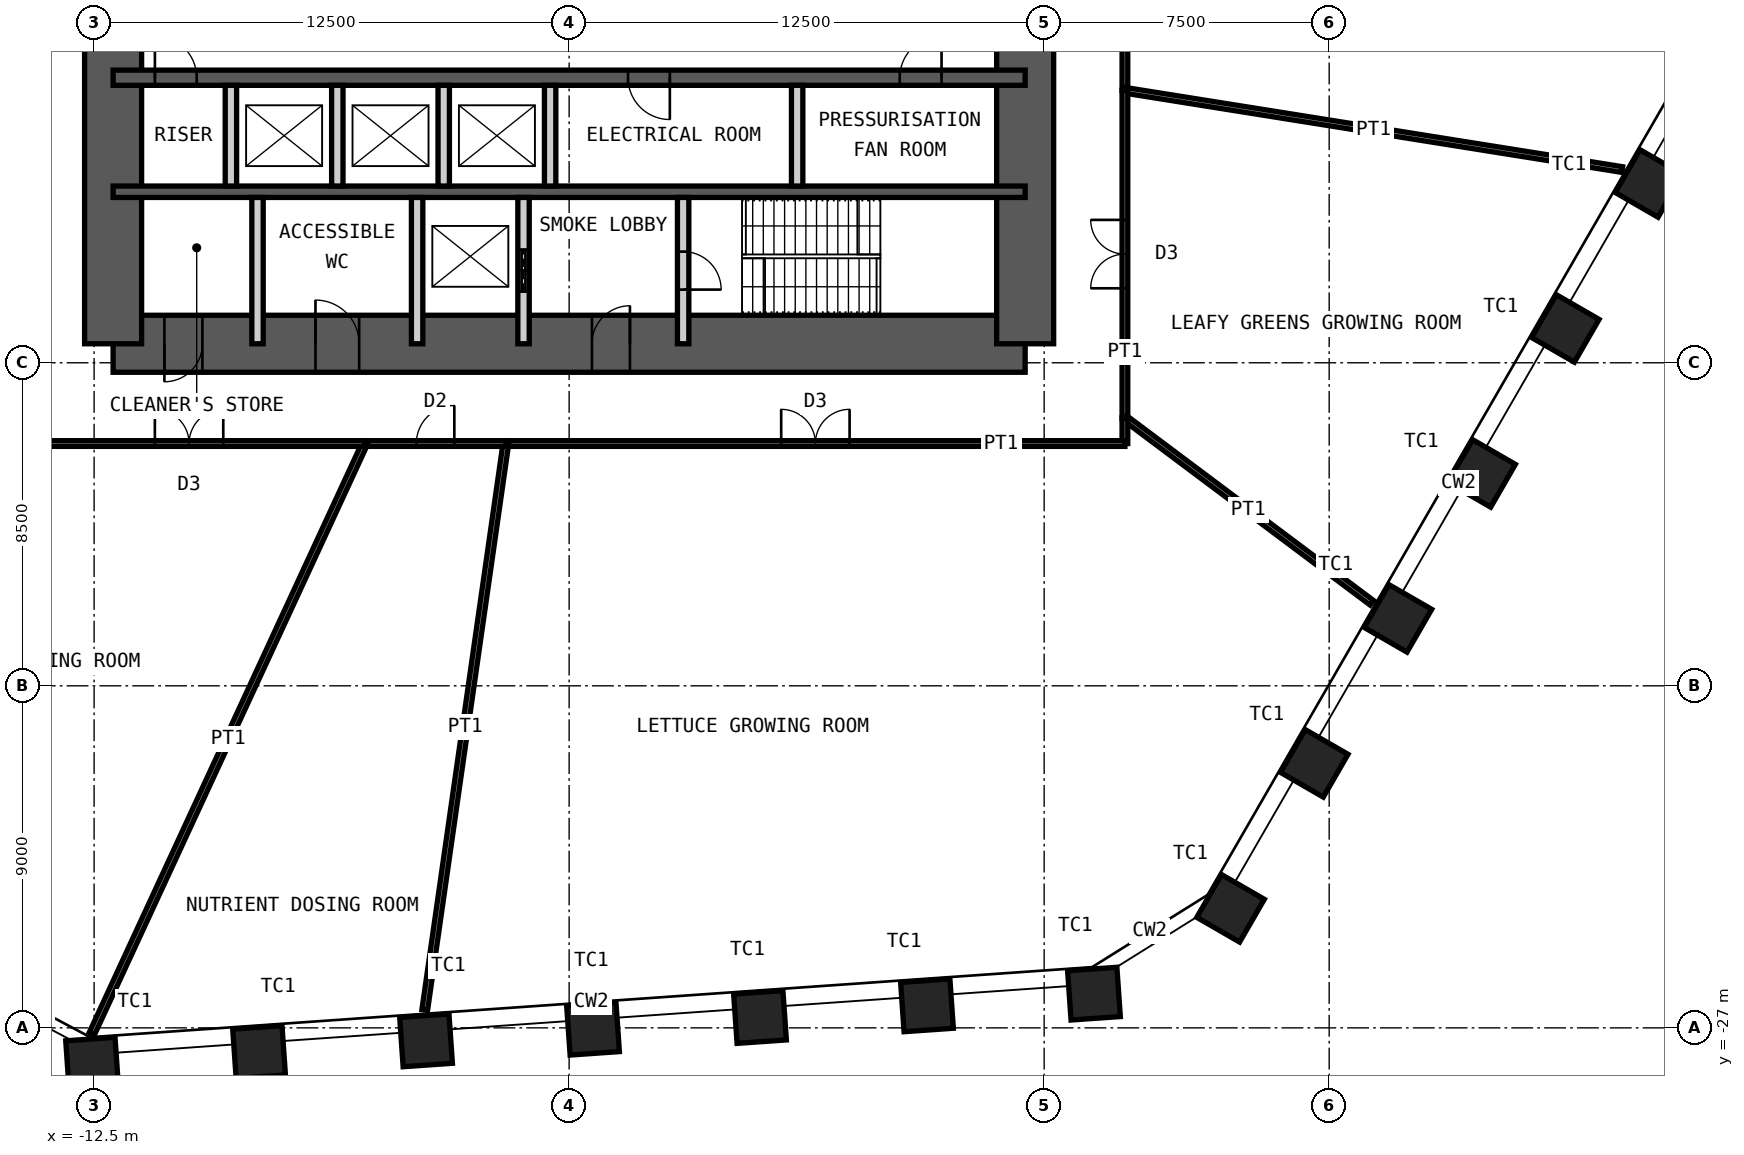
"""IFC4 building model, lengths in metres.
Left out: names, types, materials, properties, quantities, classifications, styles, units other than length and angle.
Written with IfcOpenShell. Run it as: python <this file> out.ifc"""

import sys

from ifc_helpers import new_model, si_unit, direction, frame, frame_2d, origin, origin_2d, place, context, subcontext, project, spatial, rectangle, hollow_rectangle, extrude, element, fill, save


model = new_model("IFC4")
c1 = context("Model", 3, precision=1e-05, world=origin(), true_north=direction((0.0, 1.0)))
c2 = subcontext(c1, "Body", "Model", "MODEL_VIEW")
j1 = project(units=[si_unit("LENGTHUNIT", "METRE"), si_unit("PLANEANGLEUNIT", "RADIAN")], contexts=[c1])
p1 = place(None, origin())
s1 = spatial("IfcSite", under=j1, at=p1, CompositionType="ELEMENT")
p2 = place(p1, origin())
s2 = spatial("IfcBuilding", under=s1, at=p2, CompositionType="ELEMENT")
p3 = place(p2, frame((0.0, 0.0, 37.0)))
s3 = spatial("IfcBuildingStorey", under=s2, at=p3, CompositionType="ELEMENT", Elevation=37.0)
for number, where, z_axis, x_axis in (
    (1, (28.416, -4.782, 0.0), (0.0, 0.0, 1.0), (0.5, 0.866, 0.0)),
    (2, (26.214, -8.596, 0.0), (0.0, 0.0, 1.0), (0.5, 0.866, 0.0)),
    (3, (24.011, -12.411, 0.0), (0.0, 0.0, 1.0), (0.5, 0.866, 0.0)),
    (4, (21.809, -16.225, 0.0), (0.0, 0.0, 1.0), (0.5, 0.866, 0.0)),
    (5, (19.607, -20.04, 0.0), (0.0, 0.0, 1.0), (0.5, 0.866, 0.0)),
    (6, (17.405, -23.854, 0.0), (0.0, 0.0, 1.0), (0.5, 0.866, 0.0)),
    (7, (13.811, -26.1, 0.0), (0.0, 0.0, 1.0), (0.998, 0.07, 0.0)),
    (8, (9.417, -26.407, 0.0), (0.0, 0.0, 1.0), (0.998, 0.07, 0.0)),
    (9, (5.023, -26.715, 0.0), (0.0, 0.0, 1.0), (0.998, 0.07, 0.0)),
    (10, (0.629, -27.022, 0.0), (0.0, 0.0, 1.0), (0.998, 0.07, 0.0)),
    (11, (-3.765, -27.329, 0.0), (0.0, 0.0, 1.0), (0.998, 0.07, 0.0)),
    (12, (-8.159, -27.636, 0.0), (0.0, 0.0, 1.0), (0.998, 0.07, 0.0)),
    (13, (-12.553, -27.944, 0.0), (0.0, 0.0, 1.0), (0.998, 0.07, 0.0)),
):
    element("IfcColumn", number, at=place(p3, frame(where, z_axis=z_axis, x_axis=x_axis)), inside=s3, PredefinedType="COLUMN", context=c2, shape_type="SweptSolid", body=[
        extrude(hollow_rectangle(XDim=1.3, YDim=1.3, WallThickness=0.1, at=origin_2d()), origin(), (0.0, 0.0, 1.0), 5.0),
    ])
p4 = place(p3, frame((-12.0, -9.0, 0.0), z_axis=(0.0, 0.0, 1.0), x_axis=(1.0, 0.0, 0.0)))
e14 = element("IfcWall", 14, at=p4, inside=s3, PredefinedType="SHEAR", context=c2, shape_type="SweptSolid", body=[
    extrude(rectangle(XDim=24.0, YDim=1.5, at=frame_2d((12.0, 0.0))), origin(), (0.0, 0.0, 1.0), 5.0),
])
p5 = place(p4, frame((1.35, 0.0, 0.0)))
e15 = element("IfcOpeningElement", 15, at=p5, cuts=e14, PredefinedType="OPENING", context=c2, shape_type="SweptSolid", body=[
    extrude(rectangle(XDim=1.0, YDim=2.1, at=frame_2d((0.5, 1.05))), frame((0.0, 0.76, 0.0), z_axis=(0.0, -1.0, 0.0), x_axis=(1.0, 0.0, 0.0)), (0.0, 0.0, 1.0), 1.52),
])
p6 = place(p4, frame((5.325, 0.0, 0.0)))
e16 = element("IfcOpeningElement", 16, at=p6, cuts=e14, PredefinedType="OPENING", context=c2, shape_type="SweptSolid", body=[
    extrude(rectangle(XDim=1.15, YDim=2.1, at=frame_2d((0.575, 1.05))), frame((0.0, 0.76, 0.0), z_axis=(0.0, -1.0, 0.0), x_axis=(1.0, 0.0, 0.0)), (0.0, 0.0, 1.0), 1.52),
])
p7 = place(p4, frame((12.6, 0.0, 0.0)))
e17 = element("IfcOpeningElement", 17, at=p7, cuts=e14, PredefinedType="OPENING", context=c2, shape_type="SweptSolid", body=[
    extrude(rectangle(XDim=1.0, YDim=2.1, at=frame_2d((0.5, 1.05))), frame((0.0, 0.76, 0.0), z_axis=(0.0, -1.0, 0.0), x_axis=(1.0, 0.0, 0.0)), (0.0, 0.0, 1.0), 1.52),
])
p8 = place(p3, frame((12.0, -9.0, 0.0), z_axis=(0.0, 0.0, 1.0), x_axis=(0.0, 1.0, 0.0)))
e18 = element("IfcWall", 18, at=p8, inside=s3, PredefinedType="SHEAR", context=c2, shape_type="SweptSolid", body=[
    extrude(rectangle(XDim=18.0, YDim=1.5, at=frame_2d((9.0, 0.0))), origin(), (0.0, 0.0, 1.0), 5.0),
])
p9 = place(p8, frame((8.1, 0.0, 0.0)))
e19 = element("IfcOpeningElement", 19, at=p9, cuts=e18, PredefinedType="OPENING", context=c2, shape_type="SweptSolid", body=[
    extrude(rectangle(XDim=1.8, YDim=2.1, at=frame_2d((0.9, 1.05))), frame((0.0, 0.76, 0.0), z_axis=(0.0, -1.0, 0.0), x_axis=(1.0, 0.0, 0.0)), (0.0, 0.0, 1.0), 1.52),
])
p10 = place(p3, frame((-12.0, -9.0, 0.0), z_axis=(0.0, 0.0, 1.0), x_axis=(0.0, 1.0, 0.0)))
e20 = element("IfcWall", 20, at=p10, inside=s3, PredefinedType="SHEAR", context=c2, shape_type="SweptSolid", body=[
    extrude(rectangle(XDim=18.0, YDim=1.5, at=frame_2d((9.0, 0.0))), origin(), (0.0, 0.0, 1.0), 5.0),
])
p11 = place(p10, frame((8.1, 0.0, 0.0)))
e21 = element("IfcOpeningElement", 21, at=p11, cuts=e20, PredefinedType="OPENING", context=c2, shape_type="SweptSolid", body=[
    extrude(rectangle(XDim=1.8, YDim=2.1, at=frame_2d((0.9, 1.05))), frame((0.0, 0.76, 0.0), z_axis=(0.0, -1.0, 0.0), x_axis=(1.0, 0.0, 0.0)), (0.0, 0.0, 1.0), 1.52),
])
p12 = place(p3, frame((-12.0, -2.0, 0.0), z_axis=(0.0, 0.0, 1.0), x_axis=(1.0, 0.0, 0.0)))
e22 = element("IfcWall", 22, at=p12, inside=s3, PredefinedType="SHEAR", context=c2, shape_type="SweptSolid", body=[
    extrude(rectangle(XDim=24.0, YDim=0.4, at=frame_2d((12.0, 0.0))), origin(), (0.0, 0.0, 1.0), 5.0),
])
p13 = place(p12, frame((1.1, 0.0, 0.0)))
e23 = element("IfcOpeningElement", 23, at=p13, cuts=e22, PredefinedType="OPENING", context=c2, shape_type="SweptSolid", body=[
    extrude(rectangle(XDim=1.1, YDim=2.1, at=frame_2d((0.55, 1.05))), frame((0.0, 0.21, 0.0), z_axis=(0.0, -1.0, 0.0), x_axis=(1.0, 0.0, 0.0)), (0.0, 0.0, 1.0), 0.42),
])
p14 = place(p12, frame((13.55, 0.0, 0.0)))
e24 = element("IfcOpeningElement", 24, at=p14, cuts=e22, PredefinedType="OPENING", context=c2, shape_type="SweptSolid", body=[
    extrude(rectangle(XDim=1.1, YDim=2.1, at=frame_2d((0.55, 1.05))), frame((0.0, 0.21, 0.0), z_axis=(0.0, -1.0, 0.0), x_axis=(1.0, 0.0, 0.0)), (0.0, 0.0, 1.0), 0.42),
])
p15 = place(p12, frame((20.7, 0.0, 0.0)))
e25 = element("IfcOpeningElement", 25, at=p15, cuts=e22, PredefinedType="OPENING", context=c2, shape_type="SweptSolid", body=[
    extrude(rectangle(XDim=1.1, YDim=2.1, at=frame_2d((0.55, 1.05))), frame((0.0, 0.21, 0.0), z_axis=(0.0, -1.0, 0.0), x_axis=(1.0, 0.0, 0.0)), (0.0, 0.0, 1.0), 0.42),
])
p16 = place(p3, frame((-12.0, -5.0, 0.0), z_axis=(0.0, 0.0, 1.0), x_axis=(1.0, 0.0, 0.0)))
e26 = element("IfcWall", 26, at=p16, inside=s3, PredefinedType="SHEAR", context=c2, shape_type="SweptSolid", body=[
    extrude(rectangle(XDim=24.0, YDim=0.3, at=frame_2d((12.0, 0.0))), origin(), (0.0, 0.0, 1.0), 5.0),
])
for number, where, z_axis, x_axis in (
    (27, (-8.9, -4.85, 0.0), (0.0, 0.0, 1.0), (0.0, 1.0, 0.0)),
    (28, (-6.1, -4.85, 0.0), (0.0, 0.0, 1.0), (0.0, 1.0, 0.0)),
    (29, (-3.3, -4.85, 0.0), (0.0, 0.0, 1.0), (0.0, 1.0, 0.0)),
    (30, (-0.5, -4.85, 0.0), (0.0, 0.0, 1.0), (0.0, 1.0, 0.0)),
    (31, (6.0, -4.85, 0.0), (0.0, 0.0, 1.0), (0.0, 1.0, 0.0)),
):
    element("IfcWall", number, at=place(p3, frame(where, z_axis=z_axis, x_axis=x_axis)), inside=s3, PredefinedType="PARTITIONING", context=c2, shape_type="SweptSolid", body=[
        extrude(rectangle(XDim=2.65, YDim=0.3, at=frame_2d((1.325, 0.0))), origin(), (0.0, 0.0, 1.0), 4.78),
    ])
for number, where, z_axis, x_axis in (
    (32, (-8.2, -9.0, 0.0), (0.0, 0.0, 1.0), (0.0, 1.0, 0.0)),
    (33, (-4.0, -9.0, 0.0), (0.0, 0.0, 1.0), (0.0, 1.0, 0.0)),
):
    element("IfcWall", number, at=place(p3, frame(where, z_axis=z_axis, x_axis=x_axis)), inside=s3, PredefinedType="PARTITIONING", context=c2, shape_type="SweptSolid", body=[
        extrude(rectangle(XDim=3.85, YDim=0.3, at=frame_2d((1.925, 0.0))), origin(), (0.0, 0.0, 1.0), 4.78),
    ])
p17 = place(p3, frame((-1.2, -9.0, 0.0), z_axis=(0.0, 0.0, 1.0), x_axis=(0.0, 1.0, 0.0)))
e34 = element("IfcWall", 34, at=p17, inside=s3, PredefinedType="PARTITIONING", context=c2, shape_type="SweptSolid", body=[
    extrude(rectangle(XDim=3.85, YDim=0.3, at=frame_2d((1.925, 0.0))), origin(), (0.0, 0.0, 1.0), 4.78),
])
p18 = place(p17, frame((1.375, 0.0, 0.0)))
e35 = element("IfcOpeningElement", 35, at=p18, cuts=e34, PredefinedType="OPENING", context=c2, shape_type="SweptSolid", body=[
    extrude(rectangle(XDim=1.1, YDim=2.4, at=frame_2d((0.55, 1.2))), frame((0.0, 0.16, 0.0), z_axis=(0.0, -1.0, 0.0), x_axis=(1.0, 0.0, 0.0)), (0.0, 0.0, 1.0), 0.32),
])
p19 = place(p3, frame((3.0, -9.0, 0.0), z_axis=(0.0, 0.0, 1.0), x_axis=(0.0, 1.0, 0.0)))
e36 = element("IfcWall", 36, at=p19, inside=s3, PredefinedType="PARTITIONING", context=c2, shape_type="SweptSolid", body=[
    extrude(rectangle(XDim=3.85, YDim=0.3, at=frame_2d((1.925, 0.0))), origin(), (0.0, 0.0, 1.0), 4.78),
])
p20 = place(p19, frame((1.425, 0.0, 0.0)))
e37 = element("IfcOpeningElement", 37, at=p20, cuts=e36, PredefinedType="OPENING", context=c2, shape_type="SweptSolid", body=[
    extrude(rectangle(XDim=1.0, YDim=2.1, at=frame_2d((0.5, 1.05))), frame((0.0, 0.16, 0.0), z_axis=(0.0, -1.0, 0.0), x_axis=(1.0, 0.0, 0.0)), (0.0, 0.0, 1.0), 0.32),
])
p21 = place(p3, frame((14.625, 5.864, 0.0), z_axis=(0.0, 0.0, 1.0), x_axis=(0.0, -1.0, 0.0)))
e38 = element("IfcWall", 38, at=p21, inside=s3, PredefinedType="PARTITIONING", context=c2, shape_type="SweptSolid", body=[
    extrude(rectangle(XDim=8.195, YDim=0.15, at=frame_2d((4.097, 0.0))), origin(), (0.0, 0.0, 1.0), 4.8),
])
p22 = place(p21, frame((3.198, 0.0, 0.0)))
e39 = element("IfcOpeningElement", 39, at=p22, cuts=e38, PredefinedType="OPENING", context=c2, shape_type="SweptSolid", body=[
    extrude(rectangle(XDim=1.8, YDim=2.4, at=frame_2d((0.9, 1.2))), frame((0.0, 0.085, 0.0), z_axis=(0.0, -1.0, 0.0), x_axis=(1.0, 0.0, 0.0)), (0.0, 0.0, 1.0), 0.17),
])
p23 = place(p3, frame((27.711, -4.416, 0.0), z_axis=(0.0, 0.0, 1.0), x_axis=(-0.987538625309, 0.15737682016, 0.0)))
e40 = element("IfcWall", 40, at=p23, inside=s3, PredefinedType="PARTITIONING", context=c2, shape_type="SweptSolid", body=[
    extrude(rectangle(XDim=13.251, YDim=0.15, at=frame_2d((6.625, 0.0))), origin(), (0.0, 0.0, 1.0), 3.7),
])
p24 = place(p3, frame((14.625, -2.331, 0.0), z_axis=(0.0, 0.0, 1.0), x_axis=(0.0, -1.0, 0.0)))
e41 = element("IfcWall", 41, at=p24, inside=s3, PredefinedType="PARTITIONING", context=c2, shape_type="SweptSolid", body=[
    extrude(rectangle(XDim=8.62, YDim=0.15, at=frame_2d((4.31, 0.0))), origin(), (0.0, 0.0, 1.0), 4.8),
])
p25 = place(p24, frame((3.41, 0.0, 0.0)))
e42 = element("IfcOpeningElement", 42, at=p25, cuts=e41, PredefinedType="OPENING", context=c2, shape_type="SweptSolid", body=[
    extrude(rectangle(XDim=1.8, YDim=2.4, at=frame_2d((0.9, 1.2))), frame((0.0, 0.085, 0.0), z_axis=(0.0, -1.0, 0.0), x_axis=(1.0, 0.0, 0.0)), (0.0, 0.0, 1.0), 0.17),
])
p26 = place(p3, frame((21.123, -15.815, 0.0), z_axis=(0.0, 0.0, 1.0), x_axis=(-0.800490565123, 0.599345355492, 0.0)))
e43 = element("IfcWall", 43, at=p26, inside=s3, PredefinedType="PARTITIONING", context=c2, shape_type="SweptSolid", body=[
    extrude(rectangle(XDim=8.118, YDim=0.15, at=frame_2d((4.059, 0.0))), origin(), (0.0, 0.0, 1.0), 3.7),
])
p27 = place(p3, frame((14.625, -10.95, 0.0), z_axis=(0.0, 0.0, 1.0), x_axis=(0.0, -1.0, 0.0)))
e44 = element("IfcWall", 44, at=p27, inside=s3, PredefinedType="PARTITIONING", context=c2, shape_type="SweptSolid", body=[
    extrude(rectangle(XDim=0.675, YDim=0.15, at=frame_2d((0.337, 0.0))), origin(), (0.0, 0.0, 1.0), 4.8),
])
p28 = place(p3, frame((14.625, -11.625, 0.0), z_axis=(0.0, 0.0, 1.0), x_axis=(-1.0, 0.0, 0.0)))
e45 = element("IfcWall", 45, at=p28, inside=s3, PredefinedType="PARTITIONING", context=c2, shape_type="SweptSolid", body=[
    extrude(rectangle(XDim=16.29, YDim=0.15, at=frame_2d((8.145, 0.0))), origin(), (0.0, 0.0, 1.0), 4.8),
])
p29 = place(p28, frame((7.245, 0.0, 0.0)))
e46 = element("IfcOpeningElement", 46, at=p29, cuts=e45, PredefinedType="OPENING", context=c2, shape_type="SweptSolid", body=[
    extrude(rectangle(XDim=1.8, YDim=2.4, at=frame_2d((0.9, 1.2))), frame((0.0, 0.085, 0.0), z_axis=(0.0, -1.0, 0.0), x_axis=(1.0, 0.0, 0.0)), (0.0, 0.0, 1.0), 0.17),
])
p30 = place(p3, frame((-3.8, -26.532, 0.0), z_axis=(0.0, 0.0, 1.0), x_axis=(0.14177542097, 0.989898848372, 0.0)))
e47 = element("IfcWall", 47, at=p30, inside=s3, PredefinedType="PARTITIONING", context=c2, shape_type="SweptSolid", body=[
    extrude(rectangle(XDim=15.059, YDim=0.15, at=frame_2d((7.53, 0.0))), origin(), (0.0, 0.0, 1.0), 3.7),
])
p31 = place(p3, frame((-1.665, -11.625, 0.0), z_axis=(0.0, 0.0, 1.0), x_axis=(-1.0, 0.0, 0.0)))
e48 = element("IfcWall", 48, at=p31, inside=s3, PredefinedType="PARTITIONING", context=c2, shape_type="SweptSolid", body=[
    extrude(rectangle(XDim=3.712, YDim=0.15, at=frame_2d((1.856, 0.0))), origin(), (0.0, 0.0, 1.0), 4.8),
])
p32 = place(p31, frame((1.356, 0.0, 0.0)))
e49 = element("IfcOpeningElement", 49, at=p32, cuts=e48, PredefinedType="OPENING", context=c2, shape_type="SweptSolid", body=[
    extrude(rectangle(XDim=1.0, YDim=2.4, at=frame_2d((0.5, 1.2))), frame((0.0, 0.085, 0.0), z_axis=(0.0, -1.0, 0.0), x_axis=(1.0, 0.0, 0.0)), (0.0, 0.0, 1.0), 0.17),
])
p33 = place(p3, frame((-12.56, -27.155, 0.0), z_axis=(0.0, 0.0, 1.0), x_axis=(0.419799104875, 0.907617051154, 0.0)))
e50 = element("IfcWall", 50, at=p33, inside=s3, PredefinedType="PARTITIONING", context=c2, shape_type="SweptSolid", body=[
    extrude(rectangle(XDim=17.11, YDim=0.15, at=frame_2d((8.555, 0.0))), origin(), (0.0, 0.0, 1.0), 3.7),
])
p34 = place(p3, frame((-5.377, -11.625, 0.0), z_axis=(0.0, 0.0, 1.0), x_axis=(-1.0, 0.0, 0.0)))
e51 = element("IfcWall", 51, at=p34, inside=s3, PredefinedType="PARTITIONING", context=c2, shape_type="SweptSolid", body=[
    extrude(rectangle(XDim=9.248, YDim=0.15, at=frame_2d((4.624, 0.0))), origin(), (0.0, 0.0, 1.0), 4.8),
])
p35 = place(p34, frame((3.724, 0.0, 0.0)))
e52 = element("IfcOpeningElement", 52, at=p35, cuts=e51, PredefinedType="OPENING", context=c2, shape_type="SweptSolid", body=[
    extrude(rectangle(XDim=1.8, YDim=2.4, at=frame_2d((0.9, 1.2))), frame((0.0, 0.085, 0.0), z_axis=(0.0, -1.0, 0.0), x_axis=(1.0, 0.0, 0.0)), (0.0, 0.0, 1.0), 0.17),
])
p36 = place(p5, origin())
e53 = element("IfcDoor", 53, at=p36, inside=s3, OperationType="SINGLE_SWING_LEFT", PredefinedType="DOOR", context=c2, shape_type="SweptSolid", body=[
    extrude(rectangle(XDim=1.0, YDim=2.1, at=frame_2d((0.5, 1.05))), frame((0.0, 0.025, 0.0), z_axis=(0.0, -1.0, 0.0), x_axis=(1.0, 0.0, 0.0)), (0.0, 0.0, 1.0), 0.05),
])
fill(e15, e53)
p37 = place(p6, origin())
e54 = element("IfcDoor", 54, at=p37, inside=s3, OperationType="SINGLE_SWING_RIGHT", PredefinedType="DOOR", context=c2, shape_type="SweptSolid", body=[
    extrude(rectangle(XDim=1.15, YDim=2.1, at=frame_2d((0.575, 1.05))), frame((0.0, 0.025, 0.0), z_axis=(0.0, -1.0, 0.0), x_axis=(1.0, 0.0, 0.0)), (0.0, 0.0, 1.0), 0.05),
])
fill(e16, e54)
p38 = place(p7, origin())
e55 = element("IfcDoor", 55, at=p38, inside=s3, OperationType="SINGLE_SWING_LEFT", PredefinedType="DOOR", context=c2, shape_type="SweptSolid", body=[
    extrude(rectangle(XDim=1.0, YDim=2.1, at=frame_2d((0.5, 1.05))), frame((0.0, 0.025, 0.0), z_axis=(0.0, -1.0, 0.0), x_axis=(1.0, 0.0, 0.0)), (0.0, 0.0, 1.0), 0.05),
])
fill(e17, e55)
p39 = place(p20, origin())
e56 = element("IfcDoor", 56, at=p39, inside=s3, OperationType="SINGLE_SWING_LEFT", PredefinedType="DOOR", context=c2, shape_type="SweptSolid", body=[
    extrude(rectangle(XDim=1.0, YDim=2.1, at=frame_2d((0.5, 1.05))), frame((0.0, 0.025, 0.0), z_axis=(0.0, -1.0, 0.0), x_axis=(1.0, 0.0, 0.0)), (0.0, 0.0, 1.0), 0.05),
])
fill(e37, e56)
p40 = place(p13, origin())
e57 = element("IfcDoor", 57, at=p40, inside=s3, OperationType="SINGLE_SWING_RIGHT", PredefinedType="DOOR", context=c2, shape_type="SweptSolid", body=[
    extrude(rectangle(XDim=1.1, YDim=2.1, at=frame_2d((0.55, 1.05))), frame((0.0, 0.025, 0.0), z_axis=(0.0, -1.0, 0.0), x_axis=(1.0, 0.0, 0.0)), (0.0, 0.0, 1.0), 0.05),
])
fill(e23, e57)
p41 = place(p14, origin())
e58 = element("IfcDoor", 58, at=p41, inside=s3, OperationType="SINGLE_SWING_RIGHT", PredefinedType="DOOR", context=c2, shape_type="SweptSolid", body=[
    extrude(rectangle(XDim=1.1, YDim=2.1, at=frame_2d((0.55, 1.05))), frame((0.0, 0.025, 0.0), z_axis=(0.0, -1.0, 0.0), x_axis=(1.0, 0.0, 0.0)), (0.0, 0.0, 1.0), 0.05),
])
fill(e24, e58)
p42 = place(p15, origin())
e59 = element("IfcDoor", 59, at=p42, inside=s3, OperationType="SINGLE_SWING_LEFT", PredefinedType="DOOR", context=c2, shape_type="SweptSolid", body=[
    extrude(rectangle(XDim=1.1, YDim=2.1, at=frame_2d((0.55, 1.05))), frame((0.0, 0.025, 0.0), z_axis=(0.0, -1.0, 0.0), x_axis=(1.0, 0.0, 0.0)), (0.0, 0.0, 1.0), 0.05),
])
fill(e25, e59)
p43 = place(p18, origin())
e60 = element("IfcDoor", 60, at=p43, inside=s3, OperationType="DOUBLE_DOOR_SLIDING", PredefinedType="DOOR", context=c2, shape_type="SweptSolid", body=[
    extrude(rectangle(XDim=1.1, YDim=2.4, at=frame_2d((0.55, 1.2))), frame((0.0, 0.025, 0.0), z_axis=(0.0, -1.0, 0.0), x_axis=(1.0, 0.0, 0.0)), (0.0, 0.0, 1.0), 0.05),
])
fill(e35, e60)
p44 = place(p25, origin())
e61 = element("IfcDoor", 61, at=p44, inside=s3, OperationType="DOUBLE_DOOR_DOUBLE_SWING", PredefinedType="DOOR", context=c2, shape_type="SweptSolid", body=[
    extrude(rectangle(XDim=1.8, YDim=2.4, at=frame_2d((0.9, 1.2))), frame((0.0, 0.025, 0.0), z_axis=(0.0, -1.0, 0.0), x_axis=(1.0, 0.0, 0.0)), (0.0, 0.0, 1.0), 0.05),
])
fill(e42, e61)
p45 = place(p29, origin())
e62 = element("IfcDoor", 62, at=p45, inside=s3, OperationType="DOUBLE_DOOR_DOUBLE_SWING", PredefinedType="DOOR", context=c2, shape_type="SweptSolid", body=[
    extrude(rectangle(XDim=1.8, YDim=2.4, at=frame_2d((0.9, 1.2))), frame((0.0, 0.025, 0.0), z_axis=(0.0, -1.0, 0.0), x_axis=(1.0, 0.0, 0.0)), (0.0, 0.0, 1.0), 0.05),
])
fill(e46, e62)
p46 = place(p32, origin())
e63 = element("IfcDoor", 63, at=p46, inside=s3, OperationType="SINGLE_SWING_LEFT", PredefinedType="DOOR", context=c2, shape_type="SweptSolid", body=[
    extrude(rectangle(XDim=1.0, YDim=2.4, at=frame_2d((0.5, 1.2))), frame((0.0, 0.025, 0.0), z_axis=(0.0, -1.0, 0.0), x_axis=(1.0, 0.0, 0.0)), (0.0, 0.0, 1.0), 0.05),
])
fill(e49, e63)
p47 = place(p35, origin())
e64 = element("IfcDoor", 64, at=p47, inside=s3, OperationType="DOUBLE_DOOR_DOUBLE_SWING", PredefinedType="DOOR", context=c2, shape_type="SweptSolid", body=[
    extrude(rectangle(XDim=1.8, YDim=2.4, at=frame_2d((0.9, 1.2))), frame((0.0, 0.025, 0.0), z_axis=(0.0, -1.0, 0.0), x_axis=(1.0, 0.0, 0.0)), (0.0, 0.0, 1.0), 0.05),
])
fill(e52, e64)
save(model, sys.argv[1])
